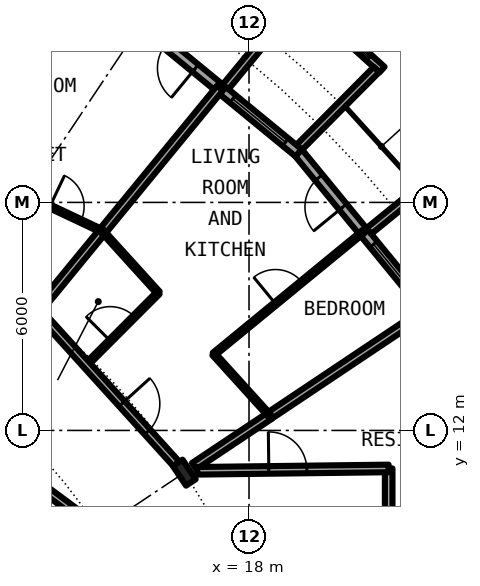
"""IFC4 building model, lengths in metres.
Left out: names, types, materials, properties, quantities, classifications, styles, units other than length and angle.
Written with IfcOpenShell. Run it as: python <this file> out.ifc"""

import sys

from ifc_helpers import new_model, si_unit, direction, frame, frame_2d, origin, origin_2d, place, context, subcontext, project, spatial, rectangle, circle, i_section, extrude, element, fill, save


model = new_model("IFC4")
c1 = context("Model", 3, precision=1e-05, world=origin(), true_north=direction((0.0, 1.0)))
c2 = subcontext(c1, "Body", "Model", "MODEL_VIEW")
j1 = project(units=[si_unit("LENGTHUNIT", "METRE"), si_unit("PLANEANGLEUNIT", "RADIAN")], contexts=[c1])
p1 = place(None, origin())
s1 = spatial("IfcSite", under=j1, at=p1, CompositionType="ELEMENT")
p2 = place(p1, origin())
s2 = spatial("IfcBuilding", under=s1, at=p2, CompositionType="ELEMENT")
p3 = place(p2, frame((0.0, 0.0, 41.1)))
s3 = spatial("IfcBuildingStorey", under=s2, at=p3, CompositionType="ELEMENT", Elevation=41.1)
p4 = place(p3, frame((16.297, 10.889, 0.0), z_axis=(0.0, 0.0, 1.0), x_axis=(0.831469612303, 0.55557023302, 0.0)))
e1 = element("IfcColumn", 1, at=p4, inside=s3, PredefinedType="COLUMN", context=c2, shape_type="SweptSolid", body=[
    extrude(i_section(OverallWidth=0.305, OverallDepth=0.62, WebThickness=0.021, FlangeThickness=0.04, FilletRadius=0.027, at=origin_2d()), origin(), (0.0, 0.0, 1.0), 3.05),
])
p5 = place(p3, frame((22.699, 15.167, 0.0), z_axis=(0.0, 0.0, 1.0), x_axis=(-0.634382322723, 0.773019449054, 0.0)))
e2 = element("IfcWall", 2, at=p5, inside=s3, PredefinedType="SOLIDWALL", context=c2, shape_type="SweptSolid", body=[
    extrude(rectangle(XDim=5.352, YDim=0.25, at=frame_2d((2.676, 0.0))), origin(), (0.0, 0.0, 1.0), 2.7),
])
p6 = place(p5, frame((0.441, 0.0, 0.3)))
e3 = element("IfcOpeningElement", 3, at=p6, cuts=e2, PredefinedType="OPENING", context=c2, shape_type="SweptSolid", body=[
    extrude(rectangle(XDim=1.8, YDim=2.1, at=frame_2d((0.9, 1.05))), frame((0.0, 0.135, 0.0), z_axis=(0.0, -1.0, 0.0), x_axis=(1.0, 0.0, 0.0)), (0.0, 0.0, 1.0), 0.27),
])
p7 = place(p5, frame((3.51, 0.0, 0.0)))
e4 = element("IfcOpeningElement", 4, at=p7, cuts=e2, PredefinedType="OPENING", context=c2, shape_type="SweptSolid", body=[
    extrude(rectangle(XDim=1.0, YDim=2.2, at=frame_2d((0.5, 1.1))), frame((0.0, 0.135, 0.0), z_axis=(0.0, -1.0, 0.0), x_axis=(1.0, 0.0, 0.0)), (0.0, 0.0, 1.0), 0.27),
])
p8 = place(p3, frame((21.155, 17.246, -0.03), z_axis=(0.0, 0.0, 1.0), x_axis=(0.775179004516, 0.631741648902, 0.0)))
e5 = element("IfcWall", 5, at=p8, inside=s3, PredefinedType="SOLIDWALL", context=c2, shape_type="SweptSolid", body=[
    extrude(rectangle(XDim=3.006, YDim=0.2, at=frame_2d((1.503, 0.0))), origin(), (0.0, 0.0, 1.0), 2.73),
])
p9 = place(p3, frame((19.304, 19.304, 0.0), z_axis=(0.0, 0.0, 1.0), x_axis=(-0.773019449054, 0.634382322723, 0.0)))
e6 = element("IfcWall", 6, at=p9, inside=s3, PredefinedType="SOLIDWALL", context=c2, shape_type="SweptSolid", body=[
    extrude(rectangle(XDim=5.352, YDim=0.25, at=frame_2d((2.676, 0.0))), origin(), (0.0, 0.0, 1.0), 2.7),
])
p10 = place(p9, frame((0.441, 0.0, 0.3)))
e7 = element("IfcOpeningElement", 7, at=p10, cuts=e6, PredefinedType="OPENING", context=c2, shape_type="SweptSolid", body=[
    extrude(rectangle(XDim=1.8, YDim=2.1, at=frame_2d((0.9, 1.05))), frame((0.0, 0.135, 0.0), z_axis=(0.0, -1.0, 0.0), x_axis=(1.0, 0.0, 0.0)), (0.0, 0.0, 1.0), 0.27),
])
p11 = place(p9, frame((3.51, 0.0, 0.0)))
e8 = element("IfcOpeningElement", 8, at=p11, cuts=e6, PredefinedType="OPENING", context=c2, shape_type="SweptSolid", body=[
    extrude(rectangle(XDim=1.0, YDim=2.2, at=frame_2d((0.5, 1.1))), frame((0.0, 0.135, 0.0), z_axis=(0.0, -1.0, 0.0), x_axis=(1.0, 0.0, 0.0)), (0.0, 0.0, 1.0), 0.27),
])
p12 = place(p3, frame((21.5, 21.493, -0.03), z_axis=(0.0, 0.0, 1.0), x_axis=(-0.740998365753, 0.671506829416, 0.0)))
e9 = element("IfcWall", 9, at=p12, inside=s3, PredefinedType="SOLIDWALL", context=c2, shape_type="SweptSolid", body=[
    extrude(rectangle(XDim=2.993, YDim=0.2, at=frame_2d((1.497, 0.0))), origin(), (0.0, 0.0, 1.0), 2.73),
])
p13 = place(p12, frame((0.457, 0.0, 0.33)))
e10 = element("IfcOpeningElement", 10, at=p13, cuts=e9, PredefinedType="OPENING", context=c2, shape_type="SweptSolid", body=[
    extrude(circle(Radius=1.04, at=frame_2d((1.04, 1.04))), frame((0.0, 0.11, 0.0), z_axis=(0.0, -1.0, 0.0), x_axis=(1.0, 0.0, 0.0)), (0.0, 0.0, 1.0), 0.22),
])
p14 = place(p3, frame((19.323, 19.45, -0.03), z_axis=(0.0, 0.0, 1.0), x_axis=(0.704476739375, 0.709727076896, 0.0)))
e11 = element("IfcWall", 11, at=p14, inside=s3, PredefinedType="SOLIDWALL", context=c2, shape_type="SweptSolid", body=[
    extrude(rectangle(XDim=2.883, YDim=0.2, at=frame_2d((1.441, 0.0))), origin(), (0.0, 0.0, 1.0), 2.73),
])
p15 = place(p3, frame((17.384, 21.041, -0.03), z_axis=(0.0, 0.0, 1.0), x_axis=(0.63709551667, 0.770784861449, 0.0)))
e12 = element("IfcWall", 12, at=p15, inside=s3, PredefinedType="SOLIDWALL", context=c2, shape_type="SweptSolid", body=[
    extrude(rectangle(XDim=3.006, YDim=0.2, at=frame_2d((1.503, 0.0))), origin(), (0.0, 0.0, 1.0), 2.73),
])
p16 = place(p3, frame((21.675, 9.4, 0.0), z_axis=(0.0, 0.0, 1.0), x_axis=(0.0, 1.0, 0.0)))
e13 = element("IfcWall", 13, at=p16, inside=s3, PredefinedType="PARTITIONING", context=c2, shape_type="SweptSolid", body=[
    extrude(rectangle(XDim=1.6, YDim=0.2, at=frame_2d((0.8, 0.0))), origin(), (0.0, 0.0, 1.0), 2.7),
])
p17 = place(p3, frame((12.432, 15.152, 0.0), z_axis=(0.0, 0.0, 1.0), x_axis=(0.634353152115, 0.77304338714, 0.0)))
e14 = element("IfcWall", 14, at=p17, inside=s3, PredefinedType="PARTITIONING", context=c2, shape_type="SweptSolid", body=[
    extrude(rectangle(XDim=7.576, YDim=0.2, at=frame_2d((3.788, 0.0))), origin(), (0.0, 0.0, 1.0), 2.7),
])
p18 = place(p3, frame((13.722, 13.73, 0.0), z_axis=(0.0, 0.0, 1.0), x_axis=(0.706741540154, 0.707471833659, 0.0)))
e15 = element("IfcWall", 15, at=p18, inside=s3, PredefinedType="PARTITIONING", context=c2, shape_type="SweptSolid", body=[
    extrude(rectangle(XDim=2.674, YDim=0.1, at=frame_2d((1.337, 0.0))), origin(), (0.0, 0.0, 1.0), 2.7),
])
p19 = place(p18, frame((0.887, 0.0, 0.0)))
e16 = element("IfcOpeningElement", 16, at=p19, cuts=e15, PredefinedType="OPENING", context=c2, shape_type="SweptSolid", body=[
    extrude(rectangle(XDim=0.9, YDim=2.3, at=frame_2d((0.45, 1.15))), frame((0.0, 0.06, 0.0), z_axis=(0.0, -1.0, 0.0), x_axis=(1.0, 0.0, 0.0)), (0.0, 0.0, 1.0), 0.12),
])
p20 = place(p3, frame((17.077, 14.006, 0.0), z_axis=(0.0, 0.0, 1.0), x_axis=(0.77326214499, 0.634086472908, 0.0)))
e17 = element("IfcWall", 17, at=p20, inside=s3, PredefinedType="PARTITIONING", context=c2, shape_type="SweptSolid", body=[
    extrude(rectangle(XDim=5.089, YDim=0.1, at=frame_2d((2.544, 0.0))), origin(), (0.0, 0.0, 1.0), 2.7),
])
p21 = place(p20, frame((2.094, 0.0, 0.0)))
e18 = element("IfcOpeningElement", 18, at=p21, cuts=e17, PredefinedType="OPENING", context=c2, shape_type="SweptSolid", body=[
    extrude(rectangle(XDim=0.9, YDim=2.3, at=frame_2d((0.45, 1.15))), frame((0.0, 0.06, 0.0), z_axis=(0.0, -1.0, 0.0), x_axis=(1.0, 0.0, 0.0)), (0.0, 0.0, 1.0), 0.12),
])
p22 = place(p3, frame((18.542, 12.389, 0.0), z_axis=(0.0, 0.0, 1.0), x_axis=(0.831387096605, 0.55569370664, 0.0)))
e19 = element("IfcWall", 19, at=p22, inside=s3, PredefinedType="PARTITIONING", context=c2, shape_type="SweptSolid", body=[
    extrude(rectangle(XDim=4.875, YDim=0.2, at=frame_2d((2.438, 0.0))), origin(), (0.0, 0.0, 1.0), 2.7),
])
p23 = place(p3, frame((16.555, 11.061, 0.0), z_axis=(0.0, 0.0, 1.0), x_axis=(0.832066006555, 0.554676627176, 0.0)))
e20 = element("IfcWall", 20, at=p23, inside=s3, PredefinedType="PARTITIONING", context=c2, shape_type="SweptSolid", body=[
    extrude(rectangle(XDim=2.39, YDim=0.2, at=frame_2d((1.195, 0.0))), origin(), (0.0, 0.0, 1.0), 2.7),
])
p24 = place(p3, frame((16.637, 10.938, 0.0), z_axis=(0.0, 0.0, 1.0), x_axis=(0.99992425795, 0.012307654658, 0.0)))
e21 = element("IfcWall", 21, at=p24, inside=s3, PredefinedType="PARTITIONING", context=c2, shape_type="SweptSolid", body=[
    extrude(rectangle(XDim=5.039, YDim=0.2, at=frame_2d((2.519, 0.0))), origin(), (0.0, 0.0, 1.0), 2.7),
])
p25 = place(p24, frame((1.884, 0.0, 0.0)))
e22 = element("IfcOpeningElement", 22, at=p25, cuts=e21, PredefinedType="OPENING", context=c2, shape_type="SweptSolid", body=[
    extrude(rectangle(XDim=1.0, YDim=2.3, at=frame_2d((0.5, 1.15))), frame((0.0, 0.11, 0.0), z_axis=(0.0, -1.0, 0.0), x_axis=(1.0, 0.0, 0.0)), (0.0, 0.0, 1.0), 0.22),
])
p26 = place(p3, frame((4.906, 16.172, 0.0), z_axis=(0.0, 0.0, 1.0), x_axis=(0.803202106898, -0.595706618626, 0.0)))
e23 = element("IfcWall", 23, at=p26, inside=s3, PredefinedType="PARTITIONING", context=c2, shape_type="SweptSolid", body=[
    extrude(rectangle(XDim=11.368, YDim=0.2, at=frame_2d((5.684, 0.0))), origin(), (0.0, 0.0, 1.0), 2.7),
])
p27 = place(p26, frame((4.38, 0.0, 0.0)))
e24 = element("IfcOpeningElement", 24, at=p27, cuts=e23, PredefinedType="OPENING", context=c2, shape_type="SweptSolid", body=[
    extrude(rectangle(XDim=1.0, YDim=2.3, at=frame_2d((0.5, 1.15))), frame((0.0, 0.11, 0.0), z_axis=(0.0, -1.0, 0.0), x_axis=(1.0, 0.0, 0.0)), (0.0, 0.0, 1.0), 0.22),
])
p28 = place(p3, frame((12.434, 15.151, 0.0), z_axis=(0.0, 0.0, 1.0), x_axis=(0.671514934772, -0.740991020444, 0.0)))
e25 = element("IfcWall", 25, at=p28, inside=s3, PredefinedType="PARTITIONING", context=c2, shape_type="SweptSolid", body=[
    extrude(rectangle(XDim=5.598, YDim=0.2, at=frame_2d((2.799, 0.0))), origin(), (0.0, 0.0, 1.0), 2.38),
])
p29 = place(p28, frame((3.305, 0.0, 0.0)))
e26 = element("IfcOpeningElement", 26, at=p29, cuts=e25, PredefinedType="OPENING", context=c2, shape_type="SweptSolid", body=[
    extrude(rectangle(XDim=1.0, YDim=2.3, at=frame_2d((0.5, 1.15))), frame((0.0, 0.11, 0.0), z_axis=(0.0, -1.0, 0.0), x_axis=(1.0, 0.0, 0.0)), (0.0, 0.0, 1.0), 0.22),
])
p30 = place(p3, frame((10.222, 19.094, 0.0), z_axis=(0.0, 0.0, 1.0), x_axis=(0.904171929575, -0.427168727518, 0.0)))
e27 = element("IfcWall", 27, at=p30, inside=s3, PredefinedType="PARTITIONING", context=c2, shape_type="SweptSolid", body=[
    extrude(rectangle(XDim=4.336, YDim=0.1, at=frame_2d((2.168, 0.0))), origin(), (0.0, 0.0, 1.0), 2.7),
])
p31 = place(p30, frame((2.808, 0.0, 0.0)))
e28 = element("IfcOpeningElement", 28, at=p31, cuts=e27, PredefinedType="OPENING", context=c2, shape_type="SweptSolid", body=[
    extrude(rectangle(XDim=0.9, YDim=2.3, at=frame_2d((0.45, 1.15))), frame((0.0, 0.06, 0.0), z_axis=(0.0, -1.0, 0.0), x_axis=(1.0, 0.0, 0.0)), (0.0, 0.0, 1.0), 0.12),
])
p32 = place(p3, frame((14.147, 17.238, 0.0), z_axis=(0.0, 0.0, 1.0), x_axis=(0.671674967707, -0.740845960882, 0.0)))
e29 = element("IfcWall", 29, at=p32, inside=s3, PredefinedType="PARTITIONING", context=c2, shape_type="SweptSolid", body=[
    extrude(rectangle(XDim=2.181, YDim=0.1, at=frame_2d((1.091, 0.0))), origin(), (0.0, 0.0, 1.0), 2.7),
])
p33 = place(p3, frame((17.072, 14.011, 0.0), z_axis=(0.0, 0.0, 1.0), x_axis=(0.67169789574, -0.740825172937, 0.0)))
e30 = element("IfcWall", 30, at=p33, inside=s3, PredefinedType="PARTITIONING", context=c2, shape_type="SweptSolid", body=[
    extrude(rectangle(XDim=2.183, YDim=0.1, at=frame_2d((1.091, 0.0))), origin(), (0.0, 0.0, 1.0), 2.7),
])
p34 = place(p6, origin())
e31 = element("IfcWindow", 31, at=p34, inside=s3, PartitioningType="SINGLE_PANEL", PredefinedType="WINDOW", context=c2, shape_type="SweptSolid", body=[
    extrude(rectangle(XDim=1.8, YDim=2.1, at=frame_2d((0.9, 1.05))), frame((0.0, 0.03, 0.0), z_axis=(0.0, -1.0, 0.0), x_axis=(1.0, 0.0, 0.0)), (0.0, 0.0, 1.0), 0.06),
])
fill(e3, e31)
p35 = place(p7, origin())
e32 = element("IfcDoor", 32, at=p35, inside=s3, OperationType="SINGLE_SWING_LEFT", PredefinedType="DOOR", context=c2, shape_type="SweptSolid", body=[
    extrude(rectangle(XDim=1.0, YDim=2.2, at=frame_2d((0.5, 1.1))), frame((0.0, 0.025, 0.0), z_axis=(0.0, -1.0, 0.0), x_axis=(1.0, 0.0, 0.0)), (0.0, 0.0, 1.0), 0.05),
])
fill(e4, e32)
p36 = place(p10, origin())
e33 = element("IfcWindow", 33, at=p36, inside=s3, PartitioningType="SINGLE_PANEL", PredefinedType="WINDOW", context=c2, shape_type="SweptSolid", body=[
    extrude(rectangle(XDim=1.8, YDim=2.1, at=frame_2d((0.9, 1.05))), frame((0.0, 0.03, 0.0), z_axis=(0.0, -1.0, 0.0), x_axis=(1.0, 0.0, 0.0)), (0.0, 0.0, 1.0), 0.06),
])
fill(e7, e33)
p37 = place(p13, origin())
e34 = element("IfcWindow", 34, at=p37, inside=s3, PartitioningType="SINGLE_PANEL", PredefinedType="WINDOW", context=c2, shape_type="SweptSolid", body=[
    extrude(circle(Radius=1.04, at=frame_2d((1.04, 1.04))), frame((0.0, 0.03, 0.0), z_axis=(0.0, -1.0, 0.0), x_axis=(1.0, 0.0, 0.0)), (0.0, 0.0, 1.0), 0.06),
])
fill(e10, e34)
p38 = place(p11, origin())
e35 = element("IfcDoor", 35, at=p38, inside=s3, OperationType="SINGLE_SWING_LEFT", PredefinedType="DOOR", context=c2, shape_type="SweptSolid", body=[
    extrude(rectangle(XDim=1.0, YDim=2.2, at=frame_2d((0.5, 1.1))), frame((0.0, 0.025, 0.0), z_axis=(0.0, -1.0, 0.0), x_axis=(1.0, 0.0, 0.0)), (0.0, 0.0, 1.0), 0.05),
])
fill(e8, e35)
p39 = place(p29, origin())
e36 = element("IfcDoor", 36, at=p39, inside=s3, OperationType="SINGLE_SWING_RIGHT", PredefinedType="DOOR", context=c2, shape_type="SweptSolid", body=[
    extrude(rectangle(XDim=1.0, YDim=2.3, at=frame_2d((0.5, 1.15))), frame((0.0, 0.025, 0.0), z_axis=(0.0, -1.0, 0.0), x_axis=(1.0, 0.0, 0.0)), (0.0, 0.0, 1.0), 0.05),
])
fill(e26, e36)
p40 = place(p19, origin())
e37 = element("IfcDoor", 37, at=p40, inside=s3, OperationType="SINGLE_SWING_RIGHT", PredefinedType="DOOR", context=c2, shape_type="SweptSolid", body=[
    extrude(rectangle(XDim=0.9, YDim=2.3, at=frame_2d((0.45, 1.15))), frame((0.0, 0.025, 0.0), z_axis=(0.0, -1.0, 0.0), x_axis=(1.0, 0.0, 0.0)), (0.0, 0.0, 1.0), 0.05),
])
fill(e16, e37)
p41 = place(p21, origin())
e38 = element("IfcDoor", 38, at=p41, inside=s3, OperationType="SINGLE_SWING_RIGHT", PredefinedType="DOOR", context=c2, shape_type="SweptSolid", body=[
    extrude(rectangle(XDim=0.9, YDim=2.3, at=frame_2d((0.45, 1.15))), frame((0.0, 0.025, 0.0), z_axis=(0.0, -1.0, 0.0), x_axis=(1.0, 0.0, 0.0)), (0.0, 0.0, 1.0), 0.05),
])
fill(e18, e38)
p42 = place(p31, origin())
e39 = element("IfcDoor", 39, at=p42, inside=s3, OperationType="SINGLE_SWING_RIGHT", PredefinedType="DOOR", context=c2, shape_type="SweptSolid", body=[
    extrude(rectangle(XDim=0.9, YDim=2.3, at=frame_2d((0.45, 1.15))), frame((0.0, 0.025, 0.0), z_axis=(0.0, -1.0, 0.0), x_axis=(1.0, 0.0, 0.0)), (0.0, 0.0, 1.0), 0.05),
])
fill(e28, e39)
p43 = place(p25, origin())
e40 = element("IfcDoor", 40, at=p43, inside=s3, OperationType="SINGLE_SWING_LEFT", PredefinedType="DOOR", context=c2, shape_type="SweptSolid", body=[
    extrude(rectangle(XDim=1.0, YDim=2.3, at=frame_2d((0.5, 1.15))), frame((0.0, 0.025, 0.0), z_axis=(0.0, -1.0, 0.0), x_axis=(1.0, 0.0, 0.0)), (0.0, 0.0, 1.0), 0.05),
])
fill(e22, e40)
save(model, sys.argv[1])
